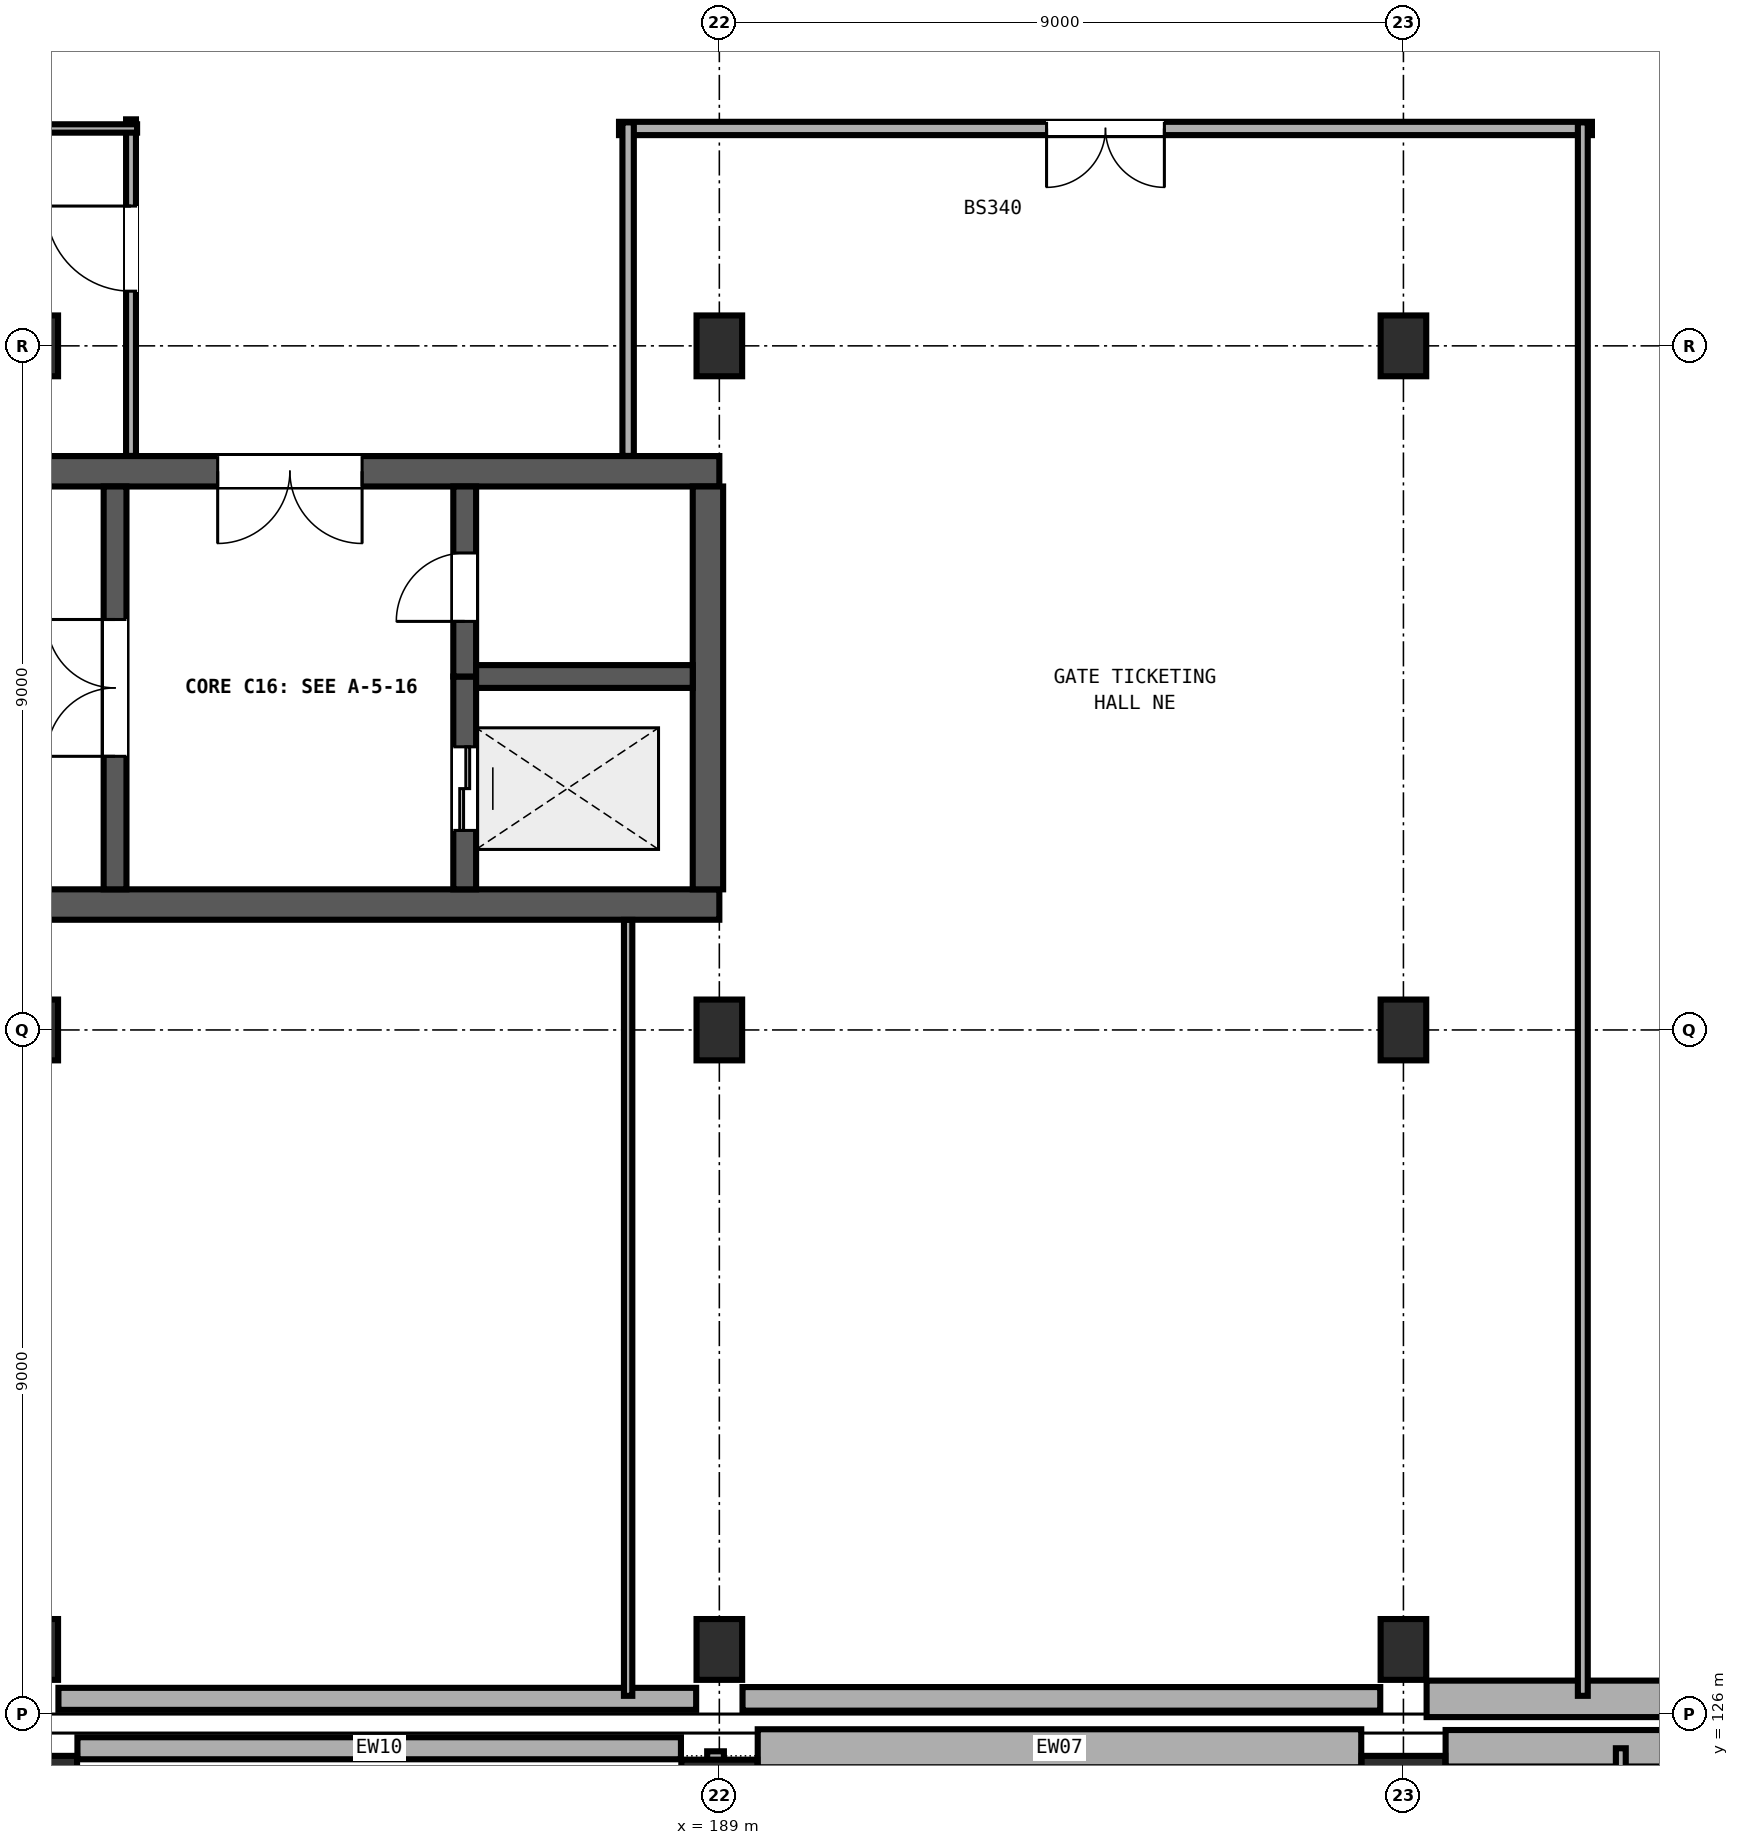
"""IFC4 building model, lengths in metres.
Left out: names, types, materials, properties, quantities, classifications, styles, units other than length and angle.
Written with IfcOpenShell. Run it as: python <this file> out.ifc"""

import sys

from ifc_helpers import new_model, si_unit, direction, frame, frame_2d, origin, origin_2d, place, context, subcontext, project, spatial, rectangle, extrude, element, fill, save


model = new_model("IFC4")
c1 = context("Model", 3, precision=1e-05, world=origin(), true_north=direction((0.0, 1.0)))
c2 = subcontext(c1, "Body", "Model", "MODEL_VIEW")
j1 = project(units=[si_unit("LENGTHUNIT", "METRE"), si_unit("PLANEANGLEUNIT", "RADIAN")], contexts=[c1])
p1 = place(None, origin())
s1 = spatial("IfcSite", under=j1, at=p1, CompositionType="ELEMENT")
p2 = place(p1, origin())
s2 = spatial("IfcBuilding", under=s1, at=p2, CompositionType="ELEMENT")
p3 = place(p2, origin())
s3 = spatial("IfcBuildingStorey", under=s2, at=p3, CompositionType="ELEMENT", Elevation=0.0)
p4 = place(p3, frame((180.0, 124.9, 0.0), z_axis=(0.0, 0.0, 1.0), x_axis=(1.0, 0.0, 0.0)))
e1 = element("IfcColumn", 1, at=p4, inside=s3, PredefinedType="COLUMN", context=c2, shape_type="SweptSolid", body=[
    extrude(rectangle(XDim=1.1, YDim=1.1, at=origin_2d()), origin(), (0.0, 0.0, 1.0), 4.8),
])
p5 = place(p3, frame((189.0, 124.9, 0.0), z_axis=(0.0, 0.0, 1.0), x_axis=(1.0, 0.0, 0.0)))
e2 = element("IfcColumn", 2, at=p5, inside=s3, PredefinedType="COLUMN", context=c2, shape_type="SweptSolid", body=[
    extrude(rectangle(XDim=1.0, YDim=1.0, at=origin_2d()), origin(), (0.0, 0.0, 1.0), 4.8),
])
p6 = place(p3, frame((198.0, 124.9, 0.0), z_axis=(0.0, 0.0, 1.0), x_axis=(1.0, 0.0, 0.0)))
e3 = element("IfcColumn", 3, at=p6, inside=s3, PredefinedType="COLUMN", context=c2, shape_type="SweptSolid", body=[
    extrude(rectangle(XDim=1.1, YDim=1.1, at=origin_2d()), origin(), (0.0, 0.0, 1.0), 4.8),
])
for number, where, z_axis, x_axis in (
    (4, (180.0, 126.85, 0.0), (0.0, 0.0, 1.0), (1.0, 0.0, 0.0)),
    (5, (180.0, 135.0, 0.0), (0.0, 0.0, 1.0), (1.0, 0.0, 0.0)),
    (6, (180.0, 144.0, 0.0), (0.0, 0.0, 1.0), (1.0, 0.0, 0.0)),
    (7, (189.0, 126.85, 0.0), (0.0, 0.0, 1.0), (1.0, 0.0, 0.0)),
    (8, (189.0, 135.0, 0.0), (0.0, 0.0, 1.0), (1.0, 0.0, 0.0)),
    (9, (189.0, 144.0, 0.0), (0.0, 0.0, 1.0), (1.0, 0.0, 0.0)),
    (10, (198.0, 126.85, 0.0), (0.0, 0.0, 1.0), (1.0, 0.0, 0.0)),
    (11, (198.0, 135.0, 0.0), (0.0, 0.0, 1.0), (1.0, 0.0, 0.0)),
    (12, (198.0, 144.0, 0.0), (0.0, 0.0, 1.0), (1.0, 0.0, 0.0)),
):
    element("IfcColumn", number, at=place(p3, frame(where, z_axis=z_axis, x_axis=x_axis)), inside=s3, PredefinedType="COLUMN", context=c2, shape_type="SweptSolid", body=[
        extrude(rectangle(XDim=0.6, YDim=0.8, at=origin_2d()), origin(), (0.0, 0.0, 1.0), 4.8),
    ])
p7 = place(p3, frame((171.0, 136.65, 0.0), z_axis=(0.0, 0.0, 1.0), x_axis=(1.0, 0.0, 0.0)))
e13 = element("IfcWall", 13, at=p7, inside=s3, PredefinedType="SHEAR", context=c2, shape_type="SweptSolid", body=[
    extrude(rectangle(XDim=18.0, YDim=0.4, at=frame_2d((9.0, 0.0))), origin(), (0.0, 0.0, 1.0), 4.5),
])
p8 = place(p3, frame((189.0, 142.35, 0.0), z_axis=(0.0, 0.0, 1.0), x_axis=(-1.0, 0.0, 0.0)))
e14 = element("IfcWall", 14, at=p8, inside=s3, PredefinedType="SHEAR", context=c2, shape_type="SweptSolid", body=[
    extrude(rectangle(XDim=18.0, YDim=0.4, at=frame_2d((9.0, 0.0))), origin(), (0.0, 0.0, 1.0), 4.5),
])
p9 = place(p8, frame((4.7, 0.0, 0.0)))
e15 = element("IfcOpeningElement", 15, at=p9, cuts=e14, PredefinedType="OPENING", context=c2, shape_type="SweptSolid", body=[
    extrude(rectangle(XDim=1.9, YDim=2.25, at=frame_2d((0.95, 1.125))), frame((0.0, 0.21, 0.0), z_axis=(0.0, -1.0, 0.0), x_axis=(1.0, 0.0, 0.0)), (0.0, 0.0, 1.0), 0.42),
])
p10 = place(p3, frame((188.85, 136.85, 0.0), z_axis=(0.0, 0.0, 1.0), x_axis=(0.0, 1.0, 0.0)))
e16 = element("IfcWall", 16, at=p10, inside=s3, PredefinedType="SHEAR", context=c2, shape_type="SweptSolid", body=[
    extrude(rectangle(XDim=5.3, YDim=0.4, at=frame_2d((2.65, 0.0))), origin(), (0.0, 0.0, 1.0), 4.5),
])
p11 = place(p3, frame((181.05, 136.85, 0.0), z_axis=(0.0, 0.0, 1.0), x_axis=(0.0, 1.0, 0.0)))
e17 = element("IfcWall", 17, at=p11, inside=s3, PredefinedType="SHEAR", context=c2, shape_type="SweptSolid", body=[
    extrude(rectangle(XDim=5.3, YDim=0.3, at=frame_2d((2.65, 0.0))), origin(), (0.0, 0.0, 1.0), 4.5),
])
p12 = place(p11, frame((1.75, 0.0, 0.0)))
e18 = element("IfcOpeningElement", 18, at=p12, cuts=e17, PredefinedType="OPENING", context=c2, shape_type="SweptSolid", body=[
    extrude(rectangle(XDim=1.8, YDim=2.25, at=frame_2d((0.9, 1.125))), frame((0.0, 0.16, 0.0), z_axis=(0.0, -1.0, 0.0), x_axis=(1.0, 0.0, 0.0)), (0.0, 0.0, 1.0), 0.32),
])
p13 = place(p3, frame((185.65, 136.85, 0.0), z_axis=(0.0, 0.0, 1.0), x_axis=(0.0, 1.0, 0.0)))
e19 = element("IfcWall", 19, at=p13, inside=s3, PredefinedType="SHEAR", context=c2, shape_type="SweptSolid", body=[
    extrude(rectangle(XDim=2.8, YDim=0.3, at=frame_2d((1.4, 0.0))), origin(), (0.0, 0.0, 1.0), 4.5),
])
p14 = place(p13, frame((0.775, 0.0, 0.0)))
e20 = element("IfcOpeningElement", 20, at=p14, cuts=e19, PredefinedType="OPENING", context=c2, shape_type="SweptSolid", body=[
    extrude(rectangle(XDim=1.1, YDim=2.1, at=frame_2d((0.55, 1.05))), frame((0.0, 0.16, 0.0), z_axis=(0.0, -1.0, 0.0), x_axis=(1.0, 0.0, 0.0)), (0.0, 0.0, 1.0), 0.32),
])
p15 = place(p3, frame((185.65, 139.65, 0.0), z_axis=(0.0, 0.0, 1.0), x_axis=(0.0, 1.0, 0.0)))
e21 = element("IfcWall", 21, at=p15, inside=s3, PredefinedType="SHEAR", context=c2, shape_type="SweptSolid", body=[
    extrude(rectangle(XDim=2.5, YDim=0.3, at=frame_2d((1.25, 0.0))), origin(), (0.0, 0.0, 1.0), 4.5),
])
p16 = place(p15, frame((0.725, 0.0, 0.0)))
e22 = element("IfcOpeningElement", 22, at=p16, cuts=e21, PredefinedType="OPENING", context=c2, shape_type="SweptSolid", body=[
    extrude(rectangle(XDim=0.9, YDim=2.1, at=frame_2d((0.45, 1.05))), frame((0.0, 0.16, 0.0), z_axis=(0.0, -1.0, 0.0), x_axis=(1.0, 0.0, 0.0)), (0.0, 0.0, 1.0), 0.32),
])
p17 = place(p3, frame((185.8, 139.65, 0.0), z_axis=(0.0, 0.0, 1.0), x_axis=(1.0, 0.0, 0.0)))
e23 = element("IfcWall", 23, at=p17, inside=s3, PredefinedType="SHEAR", context=c2, shape_type="SweptSolid", body=[
    extrude(rectangle(XDim=2.85, YDim=0.3, at=frame_2d((1.425, 0.0))), origin(), (0.0, 0.0, 1.0), 4.5),
])
p18 = place(p3, frame((180.555, 125.55, 0.0), z_axis=(0.0, 0.0, 1.0), x_axis=(1.0, 0.0, 0.0)))
e24 = element("IfcWall", 24, at=p18, inside=s3, PredefinedType="SOLIDWALL", context=c2, shape_type="SweptSolid", body=[
    extrude(rectangle(XDim=7.94, YDim=0.29, at=frame_2d((3.97, 0.0))), origin(), (0.0, 0.0, 1.0), 3.28),
])
p19 = place(p3, frame((189.505, 125.55, 0.0), z_axis=(0.0, 0.0, 1.0), x_axis=(1.0, 0.0, 0.0)))
e25 = element("IfcWall", 25, at=p19, inside=s3, PredefinedType="SOLIDWALL", context=c2, shape_type="SweptSolid", body=[
    extrude(rectangle(XDim=7.94, YDim=0.5, at=frame_2d((3.97, 0.0))), origin(), (0.0, 0.0, 1.0), 3.28),
])
p20 = place(p3, frame((198.555, 125.55, 0.0), z_axis=(0.0, 0.0, 1.0), x_axis=(1.0, 0.0, 0.0)))
e26 = element("IfcWall", 26, at=p20, inside=s3, PredefinedType="SOLIDWALL", context=c2, shape_type="SweptSolid", body=[
    extrude(rectangle(XDim=7.94, YDim=0.48, at=frame_2d((3.97, 0.0))), origin(), (0.0, 0.0, 1.0), 3.28),
])
p21 = place(p3, frame((206.695, 126.2, 0.0), z_axis=(0.0, 0.0, 1.0), x_axis=(-1.0, 0.0, 0.0)))
e27 = element("IfcWall", 27, at=p21, inside=s3, PredefinedType="SOLIDWALL", context=c2, shape_type="SweptSolid", body=[
    extrude(rectangle(XDim=8.39, YDim=0.48, at=frame_2d((4.195, 0.0))), origin(), (0.0, 0.0, 1.0), 3.28),
])
p22 = place(p3, frame((197.695, 126.2, 0.0), z_axis=(0.0, 0.0, 1.0), x_axis=(-1.0, 0.0, 0.0)))
e28 = element("IfcWall", 28, at=p22, inside=s3, PredefinedType="SOLIDWALL", context=c2, shape_type="SweptSolid", body=[
    extrude(rectangle(XDim=8.39, YDim=0.31, at=frame_2d((4.195, 0.0))), origin(), (0.0, 0.0, 1.0), 3.28),
])
p23 = place(p3, frame((188.695, 126.2, 0.0), z_axis=(0.0, 0.0, 1.0), x_axis=(-1.0, 0.0, 0.0)))
e29 = element("IfcWall", 29, at=p23, inside=s3, PredefinedType="SOLIDWALL", context=c2, shape_type="SweptSolid", body=[
    extrude(rectangle(XDim=8.39, YDim=0.29, at=frame_2d((4.195, 0.0))), origin(), (0.0, 0.0, 1.0), 3.28),
])
p24 = place(p3, frame((188.95, 125.51, 0.0), z_axis=(0.0, 0.0, 1.0), x_axis=(0.0, -1.0, 0.0)))
e30 = element("IfcWall", 30, at=p24, inside=s3, PredefinedType="PARTITIONING", context=c2, shape_type="SweptSolid", body=[
    extrude(rectangle(XDim=16.658, YDim=0.22, at=frame_2d((8.329, 0.0))), origin(), (0.0, 0.0, 1.0), 3.28),
])
p25 = place(p3, frame((200.86, 102.77, 0.0), z_axis=(0.0, 0.0, 1.0), x_axis=(0.0, 1.0, 0.0)))
e31 = element("IfcWall", 31, at=p25, inside=s3, PredefinedType="PARTITIONING", context=c2, shape_type="SweptSolid", body=[
    extrude(rectangle(XDim=22.78, YDim=0.13, at=frame_2d((11.39, 0.0))), origin(), (0.0, 0.0, 1.0), 3.28),
])
p26 = place(p25, frame((10.69, 0.0, 0.0)))
e32 = element("IfcOpeningElement", 32, at=p26, cuts=e31, PredefinedType="OPENING", context=c2, shape_type="SweptSolid", body=[
    extrude(rectangle(XDim=1.4, YDim=2.15, at=frame_2d((0.7, 1.075))), frame((0.0, 0.075, 0.0), z_axis=(0.0, -1.0, 0.0), x_axis=(1.0, 0.0, 0.0)), (0.0, 0.0, 1.0), 0.15),
])
p27 = place(p3, frame((200.48, 146.86, 0.0), z_axis=(0.0, 0.0, 1.0), x_axis=(-1.0, 0.0, 0.0)))
e33 = element("IfcWall", 33, at=p27, inside=s3, PredefinedType="PARTITIONING", context=c2, shape_type="SweptSolid", body=[
    extrude(rectangle(XDim=12.8, YDim=0.175, at=frame_2d((6.4, 0.0))), origin(), (0.0, 0.0, 1.0), 3.28),
])
p28 = place(p27, frame((5.625, 0.0, 0.0)))
e34 = element("IfcOpeningElement", 34, at=p28, cuts=e33, PredefinedType="OPENING", context=c2, shape_type="SweptSolid", body=[
    extrude(rectangle(XDim=1.55, YDim=2.2, at=frame_2d((0.775, 1.1))), frame((0.0, 0.097, 0.0), z_axis=(0.0, -1.0, 0.0), x_axis=(1.0, 0.0, 0.0)), (0.0, 0.0, 1.0), 0.195),
])
p29 = place(p3, frame((187.8, 142.552, 0.0), z_axis=(0.0, 0.0, 1.0), x_axis=(0.0, 1.0, 0.0)))
e35 = element("IfcWall", 35, at=p29, inside=s3, PredefinedType="PARTITIONING", context=c2, shape_type="SweptSolid", body=[
    extrude(rectangle(XDim=4.388, YDim=0.15, at=frame_2d((2.194, 0.0))), origin(), (0.0, 0.0, 1.0), 3.28),
])
p30 = place(p3, frame((200.36, 146.94, 0.0), z_axis=(0.0, 0.0, 1.0), x_axis=(0.0, -1.0, 0.0)))
e36 = element("IfcWall", 36, at=p30, inside=s3, PredefinedType="PARTITIONING", context=c2, shape_type="SweptSolid", body=[
    extrude(rectangle(XDim=20.7, YDim=0.13, at=frame_2d((10.35, 0.0))), origin(), (0.0, 0.0, 1.0), 3.28),
])
p31 = place(p3, frame((187.8, 126.24, 0.0), z_axis=(0.0, 0.0, 1.0), x_axis=(0.0, 1.0, 0.0)))
e37 = element("IfcWall", 37, at=p31, inside=s3, PredefinedType="PARTITIONING", context=c2, shape_type="SweptSolid", body=[
    extrude(rectangle(XDim=10.208, YDim=0.11, at=frame_2d((5.104, 0.0))), origin(), (0.0, 0.0, 1.0), 3.28),
])
p32 = place(p3, frame((181.26, 142.552, 0.0), z_axis=(0.0, 0.0, 1.0), x_axis=(0.0, 1.0, 0.0)))
e38 = element("IfcWall", 38, at=p32, inside=s3, PredefinedType="PARTITIONING", context=c2, shape_type="SweptSolid", body=[
    extrude(rectangle(XDim=4.428, YDim=0.13, at=frame_2d((2.214, 0.0))), origin(), (0.0, 0.0, 1.0), 3.28),
])
p33 = place(p32, frame((2.167, 0.0, 0.0)))
e39 = element("IfcOpeningElement", 39, at=p33, cuts=e38, PredefinedType="OPENING", context=c2, shape_type="SweptSolid", body=[
    extrude(rectangle(XDim=1.12, YDim=2.22, at=frame_2d((0.56, 1.11))), frame((0.0, 0.075, 0.0), z_axis=(0.0, -1.0, 0.0), x_axis=(1.0, 0.0, 0.0)), (0.0, 0.0, 1.0), 0.15),
])
p34 = place(p3, frame((175.04, 146.86, 0.0), z_axis=(0.0, 0.0, 1.0), x_axis=(1.0, 0.0, 0.0)))
e40 = element("IfcWall", 40, at=p34, inside=s3, PredefinedType="PARTITIONING", context=c2, shape_type="SweptSolid", body=[
    extrude(rectangle(XDim=6.3, YDim=0.11, at=frame_2d((3.15, 0.0))), origin(), (0.0, 0.0, 1.0), 3.28),
])
p35 = place(p12, origin())
e41 = element("IfcDoor", 41, at=p35, inside=s3, OperationType="DOUBLE_DOOR_SINGLE_SWING", PredefinedType="DOOR", context=c2, shape_type="SweptSolid", body=[
    extrude(rectangle(XDim=1.8, YDim=2.25, at=frame_2d((0.9, 1.125))), frame((0.0, 0.025, 0.0), z_axis=(0.0, -1.0, 0.0), x_axis=(1.0, 0.0, 0.0)), (0.0, 0.0, 1.0), 0.05),
])
fill(e18, e41)
p36 = place(p16, origin())
e42 = element("IfcDoor", 42, at=p36, inside=s3, OperationType="SINGLE_SWING_LEFT", PredefinedType="DOOR", context=c2, shape_type="SweptSolid", body=[
    extrude(rectangle(XDim=0.9, YDim=2.1, at=frame_2d((0.45, 1.05))), frame((0.0, 0.025, 0.0), z_axis=(0.0, -1.0, 0.0), x_axis=(1.0, 0.0, 0.0)), (0.0, 0.0, 1.0), 0.05),
])
fill(e22, e42)
p37 = place(p14, origin())
e43 = element("IfcDoor", 43, at=p37, inside=s3, OperationType="DOUBLE_DOOR_SLIDING", PredefinedType="DOOR", context=c2, shape_type="SweptSolid", body=[
    extrude(rectangle(XDim=1.1, YDim=2.1, at=frame_2d((0.55, 1.05))), frame((0.0, 0.025, 0.0), z_axis=(0.0, -1.0, 0.0), x_axis=(1.0, 0.0, 0.0)), (0.0, 0.0, 1.0), 0.05),
])
fill(e20, e43)
p38 = place(p9, origin())
e44 = element("IfcDoor", 44, at=p38, inside=s3, OperationType="DOUBLE_DOOR_SINGLE_SWING", PredefinedType="DOOR", context=c2, shape_type="SweptSolid", body=[
    extrude(rectangle(XDim=1.9, YDim=2.25, at=frame_2d((0.95, 1.125))), frame((0.0, 0.025, 0.0), z_axis=(0.0, -1.0, 0.0), x_axis=(1.0, 0.0, 0.0)), (0.0, 0.0, 1.0), 0.05),
])
fill(e15, e44)
p39 = place(p28, origin())
e45 = element("IfcDoor", 45, at=p39, inside=s3, OperationType="DOUBLE_DOOR_SINGLE_SWING", PredefinedType="DOOR", context=c2, shape_type="SweptSolid", body=[
    extrude(rectangle(XDim=1.55, YDim=2.2, at=frame_2d((0.775, 1.1))), frame((0.0, 0.025, 0.0), z_axis=(0.0, -1.0, 0.0), x_axis=(1.0, 0.0, 0.0)), (0.0, 0.0, 1.0), 0.05),
])
fill(e34, e45)
p40 = place(p33, origin())
e46 = element("IfcDoor", 46, at=p40, inside=s3, OperationType="SINGLE_SWING_RIGHT", PredefinedType="DOOR", context=c2, shape_type="SweptSolid", body=[
    extrude(rectangle(XDim=1.12, YDim=2.22, at=frame_2d((0.56, 1.11))), frame((0.0, 0.025, 0.0), z_axis=(0.0, -1.0, 0.0), x_axis=(1.0, 0.0, 0.0)), (0.0, 0.0, 1.0), 0.05),
])
fill(e39, e46)
save(model, sys.argv[1])
